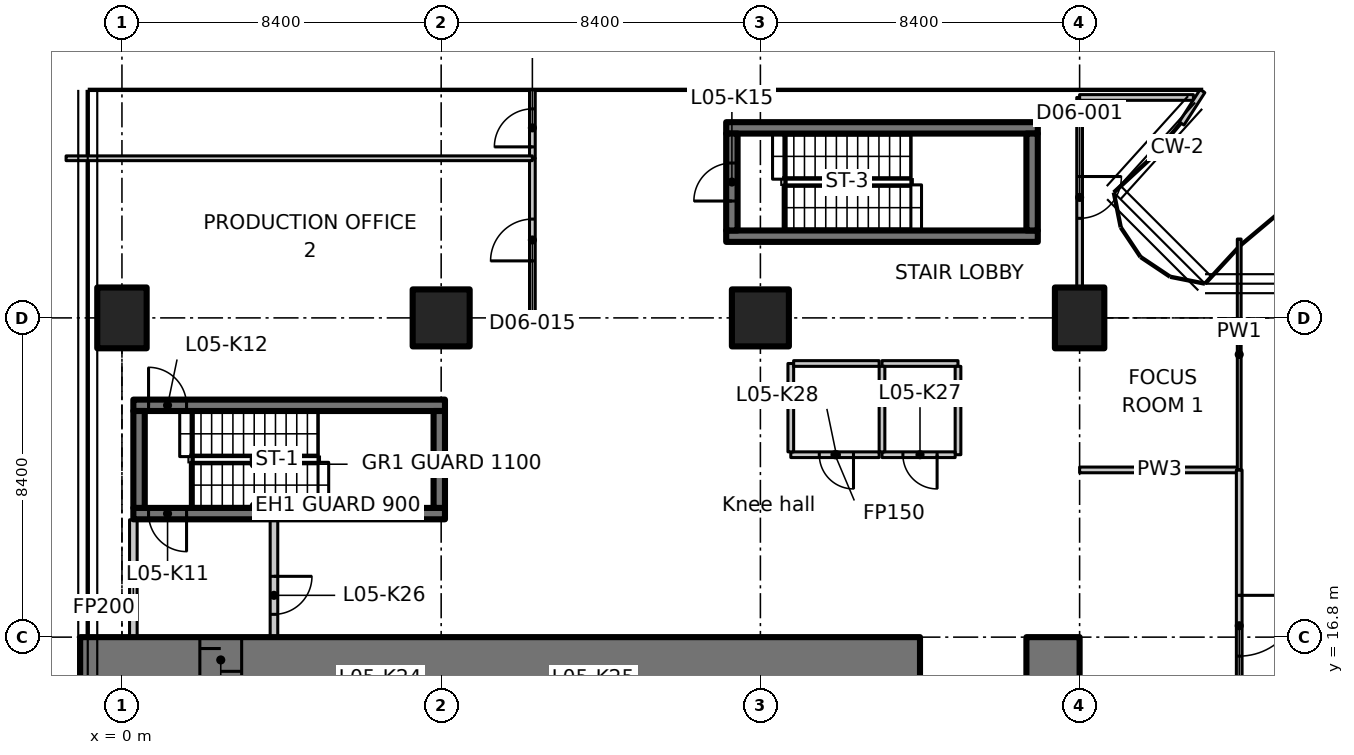
"""IFC4 building model, lengths in metres.
Left out: names, types, materials, properties, quantities, classifications, styles, units other than length and angle.
Written with IfcOpenShell. Run it as: python <this file> out.ifc"""

import sys

from ifc_helpers import new_model, si_unit, direction, frame, frame_2d, origin, origin_2d, place, context, subcontext, project, spatial, polyline, rectangle, outline, extrude, element, fill, save


model = new_model("IFC4")
c1 = context("Model", 3, precision=1e-05, world=origin(), true_north=direction((0.0, 1.0)))
c2 = subcontext(c1, "Body", "Model", "MODEL_VIEW")
j1 = project(units=[si_unit("LENGTHUNIT", "METRE"), si_unit("PLANEANGLEUNIT", "RADIAN")], contexts=[c1])
p1 = place(None, origin())
s1 = spatial("IfcSite", under=j1, at=p1, CompositionType="ELEMENT")
p2 = place(p1, origin())
s2 = spatial("IfcBuilding", under=s1, at=p2, CompositionType="ELEMENT")
p3 = place(p2, frame((0.0, 0.0, 32.0)))
s3 = spatial("IfcBuildingStorey", under=s2, at=p3, CompositionType="ELEMENT", Elevation=32.0)
p4 = place(p3, frame((0.0, 25.2, 0.0), z_axis=(0.0, 0.0, 1.0), x_axis=(1.0, 0.0, 0.0)))
e1 = element("IfcColumn", 1, at=p4, inside=s3, PredefinedType="COLUMN", context=c2, shape_type="SweptSolid", body=[
    extrude(rectangle(XDim=1.3, YDim=1.6, at=origin_2d()), origin(), (0.0, 0.0, 1.0), 4.25),
])
for number, where, z_axis, x_axis in (
    (2, (8.4, 25.2, 0.0), (0.0, 0.0, 1.0), (1.0, 0.0, 0.0)),
    (3, (16.8, 25.2, 0.0), (0.0, 0.0, 1.0), (1.0, 0.0, 0.0)),
):
    element("IfcColumn", number, at=place(p3, frame(where, z_axis=z_axis, x_axis=x_axis)), inside=s3, PredefinedType="COLUMN", context=c2, shape_type="SweptSolid", body=[
        extrude(rectangle(XDim=1.5, YDim=1.5, at=origin_2d()), origin(), (0.0, 0.0, 1.0), 4.25),
    ])
p5 = place(p3, frame((25.2, 25.2, 0.0), z_axis=(0.0, 0.0, 1.0), x_axis=(1.0, 0.0, 0.0)))
e4 = element("IfcColumn", 4, at=p5, inside=s3, PredefinedType="COLUMN", context=c2, shape_type="SweptSolid", body=[
    extrude(rectangle(XDim=1.3, YDim=1.6, at=origin_2d()), origin(), (0.0, 0.0, 1.0), 4.25),
])
p6 = place(p2, origin())
s4 = spatial("IfcBuildingStorey", under=s2, at=p6, CompositionType="ELEMENT", Elevation=0.0)
for number, where, z_axis, x_axis in (
    (5, (0.6, 32.4, -6.3), (0.0, 0.0, 1.0), (1.0, 0.0, 0.0)),
    (6, (9.0, 32.4, -6.3), (0.0, 0.0, 1.0), (1.0, 0.0, 0.0)),
):
    element("IfcWall", number, at=place(p6, frame(where, z_axis=z_axis, x_axis=x_axis)), inside=s4, PredefinedType="SOLIDWALL", context=c2, shape_type="SweptSolid", body=[
        extrude(rectangle(XDim=7.2, YDim=2.4, at=frame_2d((3.6, 0.0))), origin(), (0.0, 0.0, 1.0), 42.55),
    ])
p7 = place(p6, frame((17.4, 32.4, -6.3), z_axis=(0.0, 0.0, 1.0), x_axis=(1.0, 0.0, 0.0)))
e7 = element("IfcWall", 7, at=p7, inside=s4, PredefinedType="SOLIDWALL", context=c2, shape_type="SweptSolid", body=[
    extrude(rectangle(XDim=7.2, YDim=2.4, at=frame_2d((3.6, 0.0))), origin(), (0.0, 0.0, 1.0), 42.55),
])
p8 = place(p3, frame((-1.1, 16.2, 0.0), z_axis=(0.0, 0.0, 1.0), x_axis=(1.0, 0.0, 0.0)))
e8 = element("IfcWall", 8, at=p8, inside=s3, PredefinedType="SHEAR", context=c2, shape_type="SweptSolid", body=[
    extrude(rectangle(XDim=22.1, YDim=1.2, at=frame_2d((11.05, 0.0))), origin(), (0.0, 0.0, 1.0), 4.25),
])
p9 = place(p8, frame((3.15, 0.0, 0.0)))
e9 = element("IfcOpeningElement", 9, at=p9, cuts=e8, PredefinedType="OPENING", context=c2, shape_type="SweptSolid", body=[
    extrude(rectangle(XDim=1.1, YDim=2.3, at=frame_2d((0.55, 1.15))), frame((0.0, 0.61, 0.0), z_axis=(0.0, -1.0, 0.0), x_axis=(1.0, 0.0, 0.0)), (0.0, 0.0, 1.0), 1.22),
])
p10 = place(p3, frame((23.8, 16.2, 0.0), z_axis=(0.0, 0.0, 1.0), x_axis=(1.0, 0.0, 0.0)))
e10 = element("IfcWall", 10, at=p10, inside=s3, PredefinedType="SHEAR", context=c2, shape_type="SweptSolid", body=[
    extrude(rectangle(XDim=1.4, YDim=1.2, at=frame_2d((0.7, 0.0))), origin(), (0.0, 0.0, 1.0), 4.25),
])
p11 = place(p3, frame((8.5, 20.05, 0.0), z_axis=(0.0, 0.0, 1.0), x_axis=(-1.0, 0.0, 0.0)))
e11 = element("IfcWall", 11, at=p11, inside=s3, PredefinedType="SHEAR", context=c2, shape_type="SweptSolid", body=[
    extrude(rectangle(XDim=8.2, YDim=0.3, at=frame_2d((4.1, 0.0))), origin(), (0.0, 0.0, 1.0), 4.25),
])
p12 = place(p11, frame((6.8, 0.0, 0.0)))
e12 = element("IfcOpeningElement", 12, at=p12, cuts=e11, PredefinedType="OPENING", context=c2, shape_type="SweptSolid", body=[
    extrude(rectangle(XDim=1.0, YDim=2.1, at=frame_2d((0.5, 1.05))), frame((0.0, 0.16, 0.0), z_axis=(0.0, -1.0, 0.0), x_axis=(1.0, 0.0, 0.0)), (0.0, 0.0, 1.0), 0.32),
])
p13 = place(p3, frame((0.3, 22.9, 0.0), z_axis=(0.0, 0.0, 1.0), x_axis=(1.0, 0.0, 0.0)))
e13 = element("IfcWall", 13, at=p13, inside=s3, PredefinedType="SHEAR", context=c2, shape_type="SweptSolid", body=[
    extrude(rectangle(XDim=8.2, YDim=0.3, at=frame_2d((4.1, 0.0))), origin(), (0.0, 0.0, 1.0), 4.25),
])
p14 = place(p13, frame((0.4, 0.0, 0.0)))
e14 = element("IfcOpeningElement", 14, at=p14, cuts=e13, PredefinedType="OPENING", context=c2, shape_type="SweptSolid", body=[
    extrude(rectangle(XDim=1.0, YDim=2.1, at=frame_2d((0.5, 1.05))), frame((0.0, 0.16, 0.0), z_axis=(0.0, -1.0, 0.0), x_axis=(1.0, 0.0, 0.0)), (0.0, 0.0, 1.0), 0.32),
])
for number, where, z_axis, x_axis in (
    (15, (0.45, 20.2, 0.0), (0.0, 0.0, 1.0), (0.0, 1.0, 0.0)),
    (16, (8.35, 20.2, 0.0), (0.0, 0.0, 1.0), (0.0, 1.0, 0.0)),
):
    element("IfcWall", number, at=place(p3, frame(where, z_axis=z_axis, x_axis=x_axis)), inside=s3, PredefinedType="SHEAR", context=c2, shape_type="SweptSolid", body=[
        extrude(rectangle(XDim=2.55, YDim=0.3, at=frame_2d((1.275, 0.0))), origin(), (0.0, 0.0, 1.0), 4.25),
    ])
for number, where, z_axis, x_axis in (
    (17, (15.9, 27.35, 0.0), (0.0, 0.0, 1.0), (1.0, 0.0, 0.0)),
    (18, (15.9, 30.2, 0.0), (0.0, 0.0, 1.0), (1.0, 0.0, 0.0)),
):
    element("IfcWall", number, at=place(p3, frame(where, z_axis=z_axis, x_axis=x_axis)), inside=s3, PredefinedType="SHEAR", context=c2, shape_type="SweptSolid", body=[
        extrude(rectangle(XDim=8.2, YDim=0.3, at=frame_2d((4.1, 0.0))), origin(), (0.0, 0.0, 1.0), 4.25),
    ])
p15 = place(p3, frame((16.05, 27.5, 0.0), z_axis=(0.0, 0.0, 1.0), x_axis=(0.0, 1.0, 0.0)))
e19 = element("IfcWall", 19, at=p15, inside=s3, PredefinedType="SHEAR", context=c2, shape_type="SweptSolid", body=[
    extrude(rectangle(XDim=2.55, YDim=0.3, at=frame_2d((1.275, 0.0))), origin(), (0.0, 0.0, 1.0), 4.25),
])
p16 = place(p15, frame((0.775, 0.0, 0.0)))
e20 = element("IfcOpeningElement", 20, at=p16, cuts=e19, PredefinedType="OPENING", context=c2, shape_type="SweptSolid", body=[
    extrude(rectangle(XDim=1.0, YDim=2.1, at=frame_2d((0.5, 1.05))), frame((0.0, 0.16, 0.0), z_axis=(0.0, -1.0, 0.0), x_axis=(1.0, 0.0, 0.0)), (0.0, 0.0, 1.0), 0.32),
])
p17 = place(p3, frame((23.95, 27.5, 0.0), z_axis=(0.0, 0.0, 1.0), x_axis=(0.0, 1.0, 0.0)))
e21 = element("IfcWall", 21, at=p17, inside=s3, PredefinedType="SHEAR", context=c2, shape_type="SweptSolid", body=[
    extrude(rectangle(XDim=2.55, YDim=0.3, at=frame_2d((1.275, 0.0))), origin(), (0.0, 0.0, 1.0), 4.25),
])
p18 = place(p3, frame((0.3, 16.812, 0.0), z_axis=(0.0, 0.0, 1.0), x_axis=(0.0, 1.0, 0.0)))
e22 = element("IfcWall", 22, at=p18, inside=s3, PredefinedType="PARTITIONING", context=c2, shape_type="SweptSolid", body=[
    extrude(rectangle(XDim=3.076, YDim=0.2, at=frame_2d((1.538, 0.0))), origin(), (0.0, 0.0, 1.0), 3.88),
])
p19 = place(p3, frame((4.0, 19.888, 0.0), z_axis=(0.0, 0.0, 1.0), x_axis=(0.0, -1.0, 0.0)))
e23 = element("IfcWall", 23, at=p19, inside=s3, PredefinedType="PARTITIONING", context=c2, shape_type="SweptSolid", body=[
    extrude(rectangle(XDim=3.076, YDim=0.2, at=frame_2d((1.538, 0.0))), origin(), (0.0, 0.0, 1.0), 4.25),
])
p20 = place(p19, frame((1.488, 0.0, 0.0)))
e24 = element("IfcOpeningElement", 24, at=p20, cuts=e23, PredefinedType="OPENING", context=c2, shape_type="SweptSolid", body=[
    extrude(rectangle(XDim=1.0, YDim=2.1, at=frame_2d((0.5, 1.05))), frame((0.0, 0.11, 0.0), z_axis=(0.0, -1.0, 0.0), x_axis=(1.0, 0.0, 0.0)), (0.0, 0.0, 1.0), 0.22),
])
p21 = place(p3, frame((20.0, 24.0, 0.0), z_axis=(0.0, 0.0, 1.0), x_axis=(1.0, 0.0, 0.0)))
e25 = element("IfcWall", 25, at=p21, inside=s3, PredefinedType="PARTITIONING", context=c2, shape_type="SweptSolid", body=[
    extrude(rectangle(XDim=2.0, YDim=0.15, at=frame_2d((1.0, 0.0))), origin(), (0.0, 0.0, 1.0), 4.25),
])
p22 = place(p3, frame((22.0, 23.925, 0.0), z_axis=(0.0, 0.0, 1.0), x_axis=(0.0, -1.0, 0.0)))
e26 = element("IfcWall", 26, at=p22, inside=s3, PredefinedType="PARTITIONING", context=c2, shape_type="SweptSolid", body=[
    extrude(rectangle(XDim=2.325, YDim=0.15, at=frame_2d((1.163, 0.0))), origin(), (0.0, 0.0, 1.0), 4.25),
])
p23 = place(p3, frame((21.925, 21.6, 0.0), z_axis=(0.0, 0.0, 1.0), x_axis=(-1.0, 0.0, 0.0)))
e27 = element("IfcWall", 27, at=p23, inside=s3, PredefinedType="PARTITIONING", context=c2, shape_type="SweptSolid", body=[
    extrude(rectangle(XDim=1.925, YDim=0.15, at=frame_2d((0.962, 0.0))), origin(), (0.0, 0.0, 1.0), 4.25),
])
p24 = place(p23, frame((0.475, 0.0, 0.0)))
e28 = element("IfcOpeningElement", 28, at=p24, cuts=e27, PredefinedType="OPENING", context=c2, shape_type="SweptSolid", body=[
    extrude(rectangle(XDim=0.9, YDim=2.1, at=frame_2d((0.45, 1.05))), frame((0.0, 0.085, 0.0), z_axis=(0.0, -1.0, 0.0), x_axis=(1.0, 0.0, 0.0)), (0.0, 0.0, 1.0), 0.17),
])
p25 = place(p3, frame((20.0, 21.675, 0.0), z_axis=(0.0, 0.0, 1.0), x_axis=(0.0, 1.0, 0.0)))
e29 = element("IfcWall", 29, at=p25, inside=s3, PredefinedType="PARTITIONING", context=c2, shape_type="SweptSolid", body=[
    extrude(rectangle(XDim=2.25, YDim=0.15, at=frame_2d((1.125, 0.0))), origin(), (0.0, 0.0, 1.0), 4.25),
])
p26 = place(p3, frame((19.925, 21.6, 0.0), z_axis=(0.0, 0.0, 1.0), x_axis=(-1.0, 0.0, 0.0)))
e30 = element("IfcWall", 30, at=p26, inside=s3, PredefinedType="PARTITIONING", context=c2, shape_type="SweptSolid", body=[
    extrude(rectangle(XDim=2.325, YDim=0.15, at=frame_2d((1.163, 0.0))), origin(), (0.0, 0.0, 1.0), 4.25),
])
p27 = place(p26, frame((0.675, 0.0, 0.0)))
e31 = element("IfcOpeningElement", 31, at=p27, cuts=e30, PredefinedType="OPENING", context=c2, shape_type="SweptSolid", body=[
    extrude(rectangle(XDim=0.9, YDim=2.1, at=frame_2d((0.45, 1.05))), frame((0.0, 0.085, 0.0), z_axis=(0.0, -1.0, 0.0), x_axis=(1.0, 0.0, 0.0)), (0.0, 0.0, 1.0), 0.17),
])
p28 = place(p3, frame((17.6, 21.675, 0.0), z_axis=(0.0, 0.0, 1.0), x_axis=(0.0, 1.0, 0.0)))
e32 = element("IfcWall", 32, at=p28, inside=s3, PredefinedType="PARTITIONING", context=c2, shape_type="SweptSolid", body=[
    extrude(rectangle(XDim=2.325, YDim=0.15, at=frame_2d((1.163, 0.0))), origin(), (0.0, 0.0, 1.0), 4.25),
])
p29 = place(p3, frame((17.675, 24.0, 0.0), z_axis=(0.0, 0.0, 1.0), x_axis=(1.0, 0.0, 0.0)))
e33 = element("IfcWall", 33, at=p29, inside=s3, PredefinedType="PARTITIONING", context=c2, shape_type="SweptSolid", body=[
    extrude(rectangle(XDim=2.25, YDim=0.15, at=frame_2d((1.125, 0.0))), origin(), (0.0, 0.0, 1.0), 4.25),
])
p30 = place(p3, frame((25.2, 21.2, 0.0), z_axis=(0.0, 0.0, 1.0), x_axis=(1.0, 0.0, 0.0)))
e34 = element("IfcWall", 34, at=p30, inside=s3, PredefinedType="PARTITIONING", context=c2, shape_type="SweptSolid", body=[
    extrude(rectangle(XDim=4.2, YDim=0.15, at=frame_2d((2.1, 0.0))), origin(), (0.0, 0.0, 1.0), 4.23),
])
p31 = place(p3, frame((29.4, 21.2, 0.0), z_axis=(0.0, 0.0, 1.0), x_axis=(0.0, -1.0, 0.0)))
e35 = element("IfcWall", 35, at=p31, inside=s3, PredefinedType="PARTITIONING", context=c2, shape_type="SweptSolid", body=[
    extrude(rectangle(XDim=8.2, YDim=0.15, at=frame_2d((4.1, 0.0))), origin(), (0.0, 0.0, 1.0), 4.23),
])
p32 = place(p31, frame((3.3, 0.0, 0.0)))
e36 = element("IfcOpeningElement", 36, at=p32, cuts=e35, PredefinedType="OPENING", context=c2, shape_type="SweptSolid", body=[
    extrude(rectangle(XDim=1.6, YDim=2.1, at=frame_2d((0.8, 1.05))), frame((0.0, 0.085, 0.0), z_axis=(0.0, -1.0, 0.0), x_axis=(1.0, 0.0, 0.0)), (0.0, 0.0, 1.0), 0.17),
])
p33 = place(p3, frame((29.4, 27.275, 0.0), z_axis=(0.0, 0.0, 1.0), x_axis=(0.0, -1.0, 0.0)))
e37 = element("IfcWall", 37, at=p33, inside=s3, PredefinedType="PARTITIONING", context=c2, shape_type="SweptSolid", body=[
    extrude(outline(polyline([(0.0, 0.0), (6.075, 0.0), (6.075, 4.23), (2.525, 4.23), (2.523, 3.88), (1.627, 3.88), (1.625, 4.23), (0.0, 4.23), (0.0, 0.0)])), frame((0.0, 0.05, 0.0), z_axis=(0.0, -1.0, 0.0), x_axis=(1.0, 0.0, 0.0)), (0.0, 0.0, 1.0), 0.1),
])
p34 = place(p3, frame((25.2, 31.0, 0.0), z_axis=(0.0, 0.0, 1.0), x_axis=(0.0, -1.0, 0.0)))
e38 = element("IfcWall", 38, at=p34, inside=s3, PredefinedType="PARTITIONING", context=c2, shape_type="SweptSolid", body=[
    extrude(rectangle(XDim=4.98, YDim=0.15, at=frame_2d((2.49, 0.0))), origin(), (0.0, 0.0, 1.0), 4.23),
])
p35 = place(p34, frame((2.08, 0.0, 0.0)))
e39 = element("IfcOpeningElement", 39, at=p35, cuts=e38, PredefinedType="OPENING", context=c2, shape_type="SweptSolid", body=[
    extrude(rectangle(XDim=1.1, YDim=2.1, at=frame_2d((0.55, 1.05))), frame((0.0, 0.085, 0.0), z_axis=(0.0, -1.0, 0.0), x_axis=(1.0, 0.0, 0.0)), (0.0, 0.0, 1.0), 0.17),
])
p36 = place(p3, frame((25.2, 31.0, 0.0), z_axis=(0.0, 0.0, 1.0), x_axis=(1.0, 0.0, 0.0)))
e40 = element("IfcWall", 40, at=p36, inside=s3, PredefinedType="PARTITIONING", context=c2, shape_type="SweptSolid", body=[
    extrude(rectangle(XDim=2.994, YDim=0.15, at=frame_2d((1.497, 0.0))), origin(), (0.0, 0.0, 1.0), 4.23),
])
p37 = place(p3, frame((28.432, 31.168, 0.0), z_axis=(0.0, 0.0, 1.0), x_axis=(-0.540854867502, -0.841115932734, 0.0)))
e41 = element("IfcWall", 41, at=p37, inside=s3, PredefinedType="PARTITIONING", context=c2, shape_type="SweptSolid", body=[
    extrude(rectangle(XDim=1.015, YDim=0.15, at=frame_2d((0.507, 0.0))), origin(), (0.0, 0.0, 1.0), 4.23),
])
p38 = place(p3, frame((10.8, 25.2, 0.0), z_axis=(0.0, 0.0, 1.0), x_axis=(0.0, 1.0, 0.0)))
e42 = element("IfcWall", 42, at=p38, inside=s3, PredefinedType="PARTITIONING", context=c2, shape_type="SweptSolid", body=[
    extrude(rectangle(XDim=4.2, YDim=0.15, at=frame_2d((2.1, 0.0))), origin(), (0.0, 0.0, 1.0), 4.23),
])
p39 = place(p38, frame((1.5, 0.0, 0.0)))
e43 = element("IfcOpeningElement", 43, at=p39, cuts=e42, PredefinedType="OPENING", context=c2, shape_type="SweptSolid", body=[
    extrude(rectangle(XDim=1.1, YDim=2.1, at=frame_2d((0.55, 1.05))), frame((0.0, 0.085, 0.0), z_axis=(0.0, -1.0, 0.0), x_axis=(1.0, 0.0, 0.0)), (0.0, 0.0, 1.0), 0.17),
])
p40 = place(p3, frame((10.8, 29.4, 0.0), z_axis=(0.0, 0.0, 1.0), x_axis=(0.0, 1.0, 0.0)))
e44 = element("IfcWall", 44, at=p40, inside=s3, PredefinedType="PARTITIONING", context=c2, shape_type="SweptSolid", body=[
    extrude(rectangle(XDim=1.8, YDim=0.15, at=frame_2d((0.9, 0.0))), origin(), (0.0, 0.0, 1.0), 4.23),
])
p41 = place(p40, frame((0.3, 0.0, 0.0)))
e45 = element("IfcOpeningElement", 45, at=p41, cuts=e44, PredefinedType="OPENING", context=c2, shape_type="SweptSolid", body=[
    extrude(rectangle(XDim=1.0, YDim=2.1, at=frame_2d((0.5, 1.05))), frame((0.0, 0.085, 0.0), z_axis=(0.0, -1.0, 0.0), x_axis=(1.0, 0.0, 0.0)), (0.0, 0.0, 1.0), 0.17),
])
p42 = place(p3, frame((-1.47, 29.4, 0.0), z_axis=(0.0, 0.0, 1.0), x_axis=(1.0, 0.0, 0.0)))
e46 = element("IfcWall", 46, at=p42, inside=s3, PredefinedType="PARTITIONING", context=c2, shape_type="SweptSolid", body=[
    extrude(rectangle(XDim=12.27, YDim=0.125, at=frame_2d((6.135, 0.0))), origin(), (0.0, 0.0, 1.0), 4.23),
])
p43 = place(p9, origin())
e47 = element("IfcDoor", 47, at=p43, inside=s3, OperationType="SLIDING_TO_LEFT", PredefinedType="DOOR", context=c2, shape_type="SweptSolid", body=[
    extrude(rectangle(XDim=1.1, YDim=2.3, at=frame_2d((0.55, 1.15))), frame((0.0, 0.025, 0.0), z_axis=(0.0, -1.0, 0.0), x_axis=(1.0, 0.0, 0.0)), (0.0, 0.0, 1.0), 0.05),
])
fill(e9, e47)
p44 = place(p12, origin())
e48 = element("IfcDoor", 48, at=p44, inside=s3, OperationType="SINGLE_SWING_RIGHT", PredefinedType="DOOR", context=c2, shape_type="SweptSolid", body=[
    extrude(rectangle(XDim=1.0, YDim=2.1, at=frame_2d((0.5, 1.05))), frame((0.0, 0.025, 0.0), z_axis=(0.0, -1.0, 0.0), x_axis=(1.0, 0.0, 0.0)), (0.0, 0.0, 1.0), 0.05),
])
fill(e12, e48)
p45 = place(p14, origin())
e49 = element("IfcDoor", 49, at=p45, inside=s3, OperationType="SINGLE_SWING_LEFT", PredefinedType="DOOR", context=c2, shape_type="SweptSolid", body=[
    extrude(rectangle(XDim=1.0, YDim=2.1, at=frame_2d((0.5, 1.05))), frame((0.0, 0.025, 0.0), z_axis=(0.0, -1.0, 0.0), x_axis=(1.0, 0.0, 0.0)), (0.0, 0.0, 1.0), 0.05),
])
fill(e14, e49)
p46 = place(p16, origin())
e50 = element("IfcDoor", 50, at=p46, inside=s3, OperationType="SINGLE_SWING_RIGHT", PredefinedType="DOOR", context=c2, shape_type="SweptSolid", body=[
    extrude(rectangle(XDim=1.0, YDim=2.1, at=frame_2d((0.5, 1.05))), frame((0.0, 0.025, 0.0), z_axis=(0.0, -1.0, 0.0), x_axis=(1.0, 0.0, 0.0)), (0.0, 0.0, 1.0), 0.05),
])
fill(e20, e50)
p47 = place(p20, origin())
e51 = element("IfcDoor", 51, at=p47, inside=s3, OperationType="SINGLE_SWING_LEFT", PredefinedType="DOOR", context=c2, shape_type="SweptSolid", body=[
    extrude(rectangle(XDim=1.0, YDim=2.1, at=frame_2d((0.5, 1.05))), frame((0.0, 0.025, 0.0), z_axis=(0.0, -1.0, 0.0), x_axis=(1.0, 0.0, 0.0)), (0.0, 0.0, 1.0), 0.05),
])
fill(e24, e51)
p48 = place(p24, origin())
e52 = element("IfcDoor", 52, at=p48, inside=s3, OperationType="SINGLE_SWING_RIGHT", PredefinedType="DOOR", context=c2, shape_type="SweptSolid", body=[
    extrude(rectangle(XDim=0.9, YDim=2.1, at=frame_2d((0.45, 1.05))), frame((0.0, 0.025, 0.0), z_axis=(0.0, -1.0, 0.0), x_axis=(1.0, 0.0, 0.0)), (0.0, 0.0, 1.0), 0.05),
])
fill(e28, e52)
p49 = place(p27, origin())
e53 = element("IfcDoor", 53, at=p49, inside=s3, OperationType="SINGLE_SWING_LEFT", PredefinedType="DOOR", context=c2, shape_type="SweptSolid", body=[
    extrude(rectangle(XDim=0.9, YDim=2.1, at=frame_2d((0.45, 1.05))), frame((0.0, 0.025, 0.0), z_axis=(0.0, -1.0, 0.0), x_axis=(1.0, 0.0, 0.0)), (0.0, 0.0, 1.0), 0.05),
])
fill(e31, e53)
p50 = place(p35, origin())
e54 = element("IfcDoor", 54, at=p50, inside=s3, OperationType="SINGLE_SWING_RIGHT", PredefinedType="DOOR", context=c2, shape_type="SweptSolid", body=[
    extrude(rectangle(XDim=1.1, YDim=2.1, at=frame_2d((0.55, 1.05))), frame((0.0, 0.025, 0.0), z_axis=(0.0, -1.0, 0.0), x_axis=(1.0, 0.0, 0.0)), (0.0, 0.0, 1.0), 0.05),
])
fill(e39, e54)
p51 = place(p32, origin())
e55 = element("IfcDoor", 55, at=p51, inside=s3, OperationType="DOUBLE_DOOR_SINGLE_SWING", PredefinedType="DOOR", context=c2, shape_type="SweptSolid", body=[
    extrude(rectangle(XDim=1.6, YDim=2.1, at=frame_2d((0.8, 1.05))), frame((0.0, 0.025, 0.0), z_axis=(0.0, -1.0, 0.0), x_axis=(1.0, 0.0, 0.0)), (0.0, 0.0, 1.0), 0.05),
])
fill(e36, e55)
p52 = place(p39, origin())
e56 = element("IfcDoor", 56, at=p52, inside=s3, OperationType="SINGLE_SWING_LEFT", PredefinedType="DOOR", context=c2, shape_type="SweptSolid", body=[
    extrude(rectangle(XDim=1.1, YDim=2.1, at=frame_2d((0.55, 1.05))), frame((0.0, 0.025, 0.0), z_axis=(0.0, -1.0, 0.0), x_axis=(1.0, 0.0, 0.0)), (0.0, 0.0, 1.0), 0.05),
])
fill(e43, e56)
p53 = place(p41, origin())
e57 = element("IfcDoor", 57, at=p53, inside=s3, OperationType="SINGLE_SWING_LEFT", PredefinedType="DOOR", context=c2, shape_type="SweptSolid", body=[
    extrude(rectangle(XDim=1.0, YDim=2.1, at=frame_2d((0.5, 1.05))), frame((0.0, 0.025, 0.0), z_axis=(0.0, -1.0, 0.0), x_axis=(1.0, 0.0, 0.0)), (0.0, 0.0, 1.0), 0.05),
])
fill(e45, e57)
save(model, sys.argv[1])
